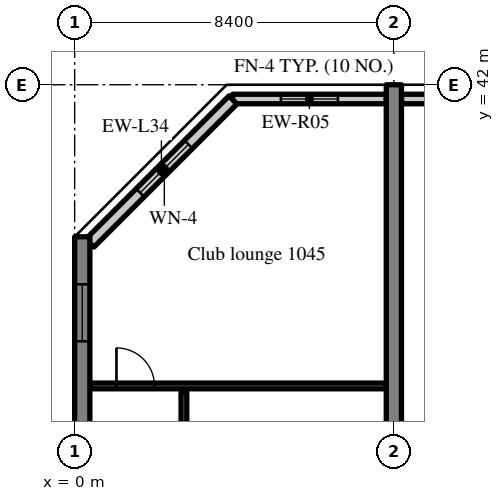
"""IFC4 building model, lengths in metres.
Left out: names, types, materials, properties, quantities, classifications, styles, units other than length and angle.
Written with IfcOpenShell. Run it as: python <this file> out.ifc"""

import sys

from ifc_helpers import new_model, si_unit, direction, frame, frame_2d, origin, place, context, subcontext, project, spatial, rectangle, extrude, source, transform, mapped, element, fill, save


model = new_model("IFC4")
c1 = context("Model", 3, precision=1e-05, world=origin(), true_north=direction((0.0, 1.0)))
c2 = subcontext(c1, "Body", "Model", "MODEL_VIEW")
j1 = project(units=[si_unit("LENGTHUNIT", "METRE"), si_unit("PLANEANGLEUNIT", "RADIAN")], contexts=[c1])
p1 = place(None, origin())
s1 = spatial("IfcSite", under=j1, at=p1, CompositionType="ELEMENT")
p2 = place(p1, origin())
s2 = spatial("IfcBuilding", under=s1, at=p2, CompositionType="ELEMENT")
p3 = place(p2, frame((0.0, 0.0, 46.8)))
s3 = spatial("IfcBuildingStorey", under=s2, at=p3, CompositionType="ELEMENT", Elevation=46.8)
m1 = source(origin(), c2, "Body", "SweptSolid", [
    extrude(rectangle(XDim=16.0, YDim=0.4, at=frame_2d((8.0, 0.0))), origin(), (0.0, 0.0, 1.0), 3.52),
])
p4 = place(p3, frame((0.2, 22.0, 0.0), z_axis=(0.0, 0.0, 1.0), x_axis=(0.0, 1.0, 0.0)))
e1 = element("IfcWall", 1, at=p4, inside=s3, PredefinedType="SHEAR", context=c2, shape_type="MappedRepresentation", body=[
    mapped(m1, transform((0.0, 0.0, 0.0), scale=1.0)),
])
m2 = source(origin(), c2, "Body", "SweptSolid", [
    extrude(rectangle(XDim=1.5, YDim=1.5, at=frame_2d((0.75, 0.75))), frame((0.0, 0.21, 0.0), z_axis=(0.0, -1.0, 0.0), x_axis=(1.0, 0.0, 0.0)), (0.0, 0.0, 1.0), 0.42),
])
p5 = place(p4, frame((1.25, 0.0, 0.9)))
e2 = element("IfcOpeningElement", 2, at=p5, cuts=e1, PredefinedType="OPENING", context=c2, shape_type="MappedRepresentation", body=[
    mapped(m2, transform((0.0, 0.0, 0.0), scale=1.0)),
])
p6 = place(p4, frame((5.25, 0.0, 0.9)))
e3 = element("IfcOpeningElement", 3, at=p6, cuts=e1, PredefinedType="OPENING", context=c2, shape_type="MappedRepresentation", body=[
    mapped(m2, transform((0.0, 0.0, 0.0), scale=1.0)),
])
p7 = place(p4, frame((9.25, 0.0, 0.9)))
e4 = element("IfcOpeningElement", 4, at=p7, cuts=e1, PredefinedType="OPENING", context=c2, shape_type="MappedRepresentation", body=[
    mapped(m2, transform((0.0, 0.0, 0.0), scale=1.0)),
])
p8 = place(p4, frame((13.25, 0.0, 0.9)))
e5 = element("IfcOpeningElement", 5, at=p8, cuts=e1, PredefinedType="OPENING", context=c2, shape_type="MappedRepresentation", body=[
    mapped(m2, transform((0.0, 0.0, 0.0), scale=1.0)),
])
m3 = source(origin(), c2, "Body", "SweptSolid", [
    extrude(rectangle(XDim=20.0, YDim=0.4, at=frame_2d((10.0, 0.0))), origin(), (0.0, 0.0, 1.0), 3.52),
])
p9 = place(p3, frame((8.4, 22.0, 0.0), z_axis=(0.0, 0.0, 1.0), x_axis=(0.0, 1.0, 0.0)))
e6 = element("IfcWall", 6, at=p9, inside=s3, PredefinedType="SHEAR", context=c2, shape_type="MappedRepresentation", body=[
    mapped(m3, transform((0.0, 0.0, 0.0), scale=1.0)),
])
m4 = source(origin(), c2, "Body", "SweptSolid", [
    extrude(rectangle(XDim=4.045, YDim=0.25, at=frame_2d((2.022, 0.0))), origin(), (0.0, 0.0, 1.0), 2.82),
])
p10 = place(p3, frame((8.2, 41.625, 0.0), z_axis=(0.0, 0.0, 1.0), x_axis=(-1.0, 0.0, 0.0)))
e7 = element("IfcWall", 7, at=p10, inside=s3, PredefinedType="SOLIDWALL", context=c2, shape_type="MappedRepresentation", body=[
    mapped(m4, transform((0.0, 0.0, 0.0), scale=1.0)),
])
m5 = source(origin(), c2, "Body", "SweptSolid", [
    extrude(rectangle(XDim=1.5, YDim=1.5, at=frame_2d((0.75, 0.75))), frame((0.0, 0.135, 0.0), z_axis=(0.0, -1.0, 0.0), x_axis=(1.0, 0.0, 0.0)), (0.0, 0.0, 1.0), 0.27),
])
p11 = place(p10, frame((1.272, 0.0, 0.9)))
e8 = element("IfcOpeningElement", 8, at=p11, cuts=e7, PredefinedType="OPENING", context=c2, shape_type="MappedRepresentation", body=[
    mapped(m5, transform((0.0, 0.0, 0.0), scale=1.0)),
])
m6 = source(origin(), c2, "Body", "SweptSolid", [
    extrude(rectangle(XDim=3.6, YDim=0.25, at=frame_2d((1.8, 0.0))), origin(), (0.0, 0.0, 1.0), 2.82),
])
p12 = place(p3, frame((12.2, 41.625, 0.0), z_axis=(0.0, 0.0, 1.0), x_axis=(-1.0, 0.0, 0.0)))
e9 = element("IfcWall", 9, at=p12, inside=s3, PredefinedType="SOLIDWALL", context=c2, shape_type="MappedRepresentation", body=[
    mapped(m6, transform((0.0, 0.0, 0.0), scale=1.0)),
])
p13 = place(p12, frame((1.05, 0.0, 0.9)))
e10 = element("IfcOpeningElement", 10, at=p13, cuts=e9, PredefinedType="OPENING", context=c2, shape_type="MappedRepresentation", body=[
    mapped(m5, transform((0.0, 0.0, 0.0), scale=1.0)),
])
m7 = source(origin(), c2, "Body", "SweptSolid", [
    extrude(rectangle(XDim=5.326, YDim=0.3, at=frame_2d((2.663, 0.0))), origin(), (0.0, 0.0, 1.0), 3.52),
])
p14 = place(p3, frame((4.166, 41.6, 0.0), z_axis=(0.0, 0.0, 1.0), x_axis=(-0.707106781187, -0.707106781187, 0.0)))
e11 = element("IfcWall", 11, at=p14, inside=s3, PredefinedType="SOLIDWALL", context=c2, shape_type="MappedRepresentation", body=[
    mapped(m7, transform((0.0, 0.0, 0.0), scale=1.0)),
])
m8 = source(origin(), c2, "Body", "SweptSolid", [
    extrude(rectangle(XDim=1.8, YDim=1.5, at=frame_2d((0.9, 0.75))), frame((0.0, 0.16, 0.0), z_axis=(0.0, -1.0, 0.0), x_axis=(1.0, 0.0, 0.0)), (0.0, 0.0, 1.0), 0.32),
])
p15 = place(p14, frame((1.654, 0.0, 0.9)))
e12 = element("IfcOpeningElement", 12, at=p15, cuts=e11, PredefinedType="OPENING", context=c2, shape_type="MappedRepresentation", body=[
    mapped(m8, transform((0.0, 0.0, 0.0), scale=1.0)),
])
m9 = source(origin(), c2, "Body", "SweptSolid", [
    extrude(rectangle(XDim=4.45, YDim=0.15, at=frame_2d((2.225, 0.0))), origin(), (0.0, 0.0, 1.0), 3.52),
])
p16 = place(p3, frame((2.875, 29.475, 0.0), z_axis=(0.0, 0.0, 1.0), x_axis=(0.0, 1.0, 0.0)))
e13 = element("IfcWall", 13, at=p16, inside=s3, PredefinedType="PARTITIONING", context=c2, shape_type="MappedRepresentation", body=[
    mapped(m9, transform((0.0, 0.0, 0.0), scale=1.0)),
])
m10 = source(origin(), c2, "Body", "SweptSolid", [
    extrude(rectangle(XDim=1.0, YDim=2.1, at=frame_2d((0.5, 1.05))), frame((0.0, 0.085, 0.0), z_axis=(0.0, -1.0, 0.0), x_axis=(1.0, 0.0, 0.0)), (0.0, 0.0, 1.0), 0.17),
])
p17 = place(p16, frame((1.725, 0.0, 0.0)))
e14 = element("IfcOpeningElement", 14, at=p17, cuts=e13, PredefinedType="OPENING", context=c2, shape_type="MappedRepresentation", body=[
    mapped(m10, transform((0.0, 0.0, 0.0), scale=1.0)),
])
m11 = source(origin(), c2, "Body", "SweptSolid", [
    extrude(rectangle(XDim=7.8, YDim=0.15, at=frame_2d((3.9, 0.0))), origin(), (0.0, 0.0, 1.0), 3.52),
])
p18 = place(p3, frame((0.4, 34.075, 0.0), z_axis=(0.0, 0.0, 1.0), x_axis=(1.0, 0.0, 0.0)))
e15 = element("IfcWall", 15, at=p18, inside=s3, PredefinedType="PARTITIONING", context=c2, shape_type="MappedRepresentation", body=[
    mapped(m11, transform((0.0, 0.0, 0.0), scale=1.0)),
])
p19 = place(p18, frame((0.7, 0.0, 0.0)))
e16 = element("IfcOpeningElement", 16, at=p19, cuts=e15, PredefinedType="OPENING", context=c2, shape_type="MappedRepresentation", body=[
    mapped(m10, transform((0.0, 0.0, 0.0), scale=1.0)),
])
m12 = source(origin(), c2, "Body", "SweptSolid", [
    extrude(rectangle(XDim=1.5, YDim=1.5, at=frame_2d((0.75, 0.75))), frame((0.0, 0.03, 0.0), z_axis=(0.0, -1.0, 0.0), x_axis=(1.0, 0.0, 0.0)), (0.0, 0.0, 1.0), 0.06),
])
p20 = place(p11, origin())
e17 = element("IfcWindow", 17, at=p20, inside=s3, PartitioningType="SINGLE_PANEL", PredefinedType="WINDOW", context=c2, shape_type="MappedRepresentation", body=[
    mapped(m12, transform((0.0, 0.0, 0.0), scale=1.0)),
])
fill(e8, e17)
m13 = source(origin(), c2, "Body", "SweptSolid", [
    extrude(rectangle(XDim=1.8, YDim=1.5, at=frame_2d((0.9, 0.75))), frame((0.0, 0.03, 0.0), z_axis=(0.0, -1.0, 0.0), x_axis=(1.0, 0.0, 0.0)), (0.0, 0.0, 1.0), 0.06),
])
p21 = place(p15, origin())
e18 = element("IfcWindow", 18, at=p21, inside=s3, PartitioningType="SINGLE_PANEL", PredefinedType="WINDOW", context=c2, shape_type="MappedRepresentation", body=[
    mapped(m13, transform((0.0, 0.0, 0.0), scale=1.0)),
])
fill(e12, e18)
p22 = place(p8, origin())
e19 = element("IfcWindow", 19, at=p22, inside=s3, PartitioningType="SINGLE_PANEL", PredefinedType="WINDOW", context=c2, shape_type="MappedRepresentation", body=[
    mapped(m12, transform((0.0, 0.0, 0.0), scale=1.0)),
])
fill(e5, e19)
m14 = source(origin(), c2, "Body", "SweptSolid", [
    extrude(rectangle(XDim=1.0, YDim=2.1, at=frame_2d((0.5, 1.05))), frame((0.0, 0.025, 0.0), z_axis=(0.0, -1.0, 0.0), x_axis=(1.0, 0.0, 0.0)), (0.0, 0.0, 1.0), 0.05),
])
p23 = place(p19, origin())
e20 = element("IfcDoor", 20, at=p23, inside=s3, OperationType="SINGLE_SWING_LEFT", PredefinedType="DOOR", context=c2, shape_type="MappedRepresentation", body=[
    mapped(m14, transform((0.0, 0.0, 0.0), scale=1.0)),
])
fill(e16, e20)
save(model, sys.argv[1])
